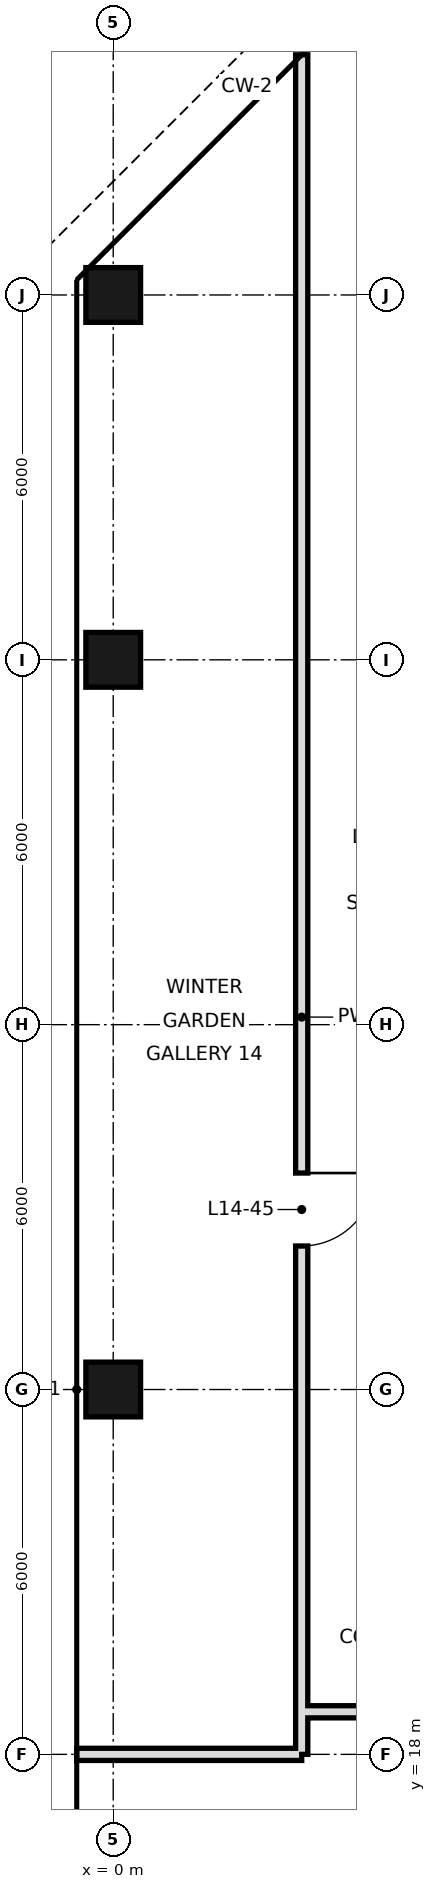
"""IFC4 building model, lengths in metres.
Left out: names, types, materials, properties, quantities, classifications, styles, units other than length and angle.
Written with IfcOpenShell. Run it as: python <this file> out.ifc"""

import sys

from ifc_helpers import new_model, si_unit, direction, frame, frame_2d, origin, origin_2d, place, context, subcontext, project, spatial, rectangle, hollow_rectangle, extrude, element, fill, save


model = new_model("IFC4")
c1 = context("Model", 3, precision=1e-05, world=origin(), true_north=direction((0.0, 1.0)))
c2 = subcontext(c1, "Body", "Model", "MODEL_VIEW")
j1 = project(units=[si_unit("LENGTHUNIT", "METRE"), si_unit("PLANEANGLEUNIT", "RADIAN")], contexts=[c1])
p1 = place(None, origin())
s1 = spatial("IfcSite", under=j1, at=p1, CompositionType="ELEMENT")
p2 = place(p1, origin())
s2 = spatial("IfcBuilding", under=s1, at=p2, CompositionType="ELEMENT")
p3 = place(p2, frame((0.0, 0.0, 71.4)))
s3 = spatial("IfcBuildingStorey", under=s2, at=p3, CompositionType="ELEMENT", Elevation=71.4)
for number, where, z_axis, x_axis in (
    (1, (0.0, 24.0, 0.0), (0.0, 0.0, 1.0), (1.0, 0.0, 0.0)),
    (2, (0.0, 36.0, 0.0), (0.0, 0.0, 1.0), (1.0, 0.0, 0.0)),
    (3, (0.0, 42.0, 0.0), (0.0, 0.0, 1.0), (1.0, 0.0, 0.0)),
):
    element("IfcColumn", number, at=place(p3, frame(where, z_axis=z_axis, x_axis=x_axis)), inside=s3, PredefinedType="COLUMN", context=c2, shape_type="SweptSolid", body=[
        extrude(hollow_rectangle(XDim=0.9, YDim=0.9, WallThickness=0.045, at=origin_2d()), origin(), (0.0, 0.0, 1.0), 3.6),
    ])
p4 = place(p3, frame((3.1, 18.0, 0.0), z_axis=(0.0, 0.0, 1.0), x_axis=(0.0, 1.0, 0.0)))
e4 = element("IfcWall", 4, at=p4, inside=s3, PredefinedType="SOLIDWALL", context=c2, shape_type="SweptSolid", body=[
    extrude(rectangle(XDim=27.949, YDim=0.2, at=frame_2d((13.975, 0.0))), origin(), (0.0, 0.0, 1.0), 2.97),
])
p5 = place(p4, frame((8.36, 0.0, 0.0)))
e5 = element("IfcOpeningElement", 5, at=p5, cuts=e4, PredefinedType="OPENING", context=c2, shape_type="SweptSolid", body=[
    extrude(rectangle(XDim=1.2, YDim=2.4, at=frame_2d((0.6, 1.2))), frame((0.0, 0.11, 0.0), z_axis=(0.0, -1.0, 0.0), x_axis=(1.0, 0.0, 0.0)), (0.0, 0.0, 1.0), 0.22),
])
p6 = place(p3, frame((-0.6, 18.0, 0.0), z_axis=(0.0, 0.0, 1.0), x_axis=(1.0, 0.0, 0.0)))
e6 = element("IfcWall", 6, at=p6, inside=s3, PredefinedType="SOLIDWALL", context=c2, shape_type="SweptSolid", body=[
    extrude(rectangle(XDim=3.7, YDim=0.2, at=frame_2d((1.85, 0.0))), origin(), (0.0, 0.0, 1.0), 2.72),
])
p7 = place(p3, frame((3.1, 18.7, 0.0), z_axis=(0.0, 0.0, 1.0), x_axis=(1.0, 0.0, 0.0)))
e7 = element("IfcWall", 7, at=p7, inside=s3, PredefinedType="SOLIDWALL", context=c2, shape_type="SweptSolid", body=[
    extrude(rectangle(XDim=18.5, YDim=0.2, at=frame_2d((9.25, 0.0))), origin(), (0.0, 0.0, 1.0), 2.72),
])
p8 = place(p5, origin())
e8 = element("IfcDoor", 8, at=p8, inside=s3, OperationType="SINGLE_SWING_RIGHT", PredefinedType="DOOR", context=c2, shape_type="SweptSolid", body=[
    extrude(rectangle(XDim=1.2, YDim=2.4, at=frame_2d((0.6, 1.2))), frame((0.0, 0.025, 0.0), z_axis=(0.0, -1.0, 0.0), x_axis=(1.0, 0.0, 0.0)), (0.0, 0.0, 1.0), 0.05),
])
fill(e5, e8)
save(model, sys.argv[1])
